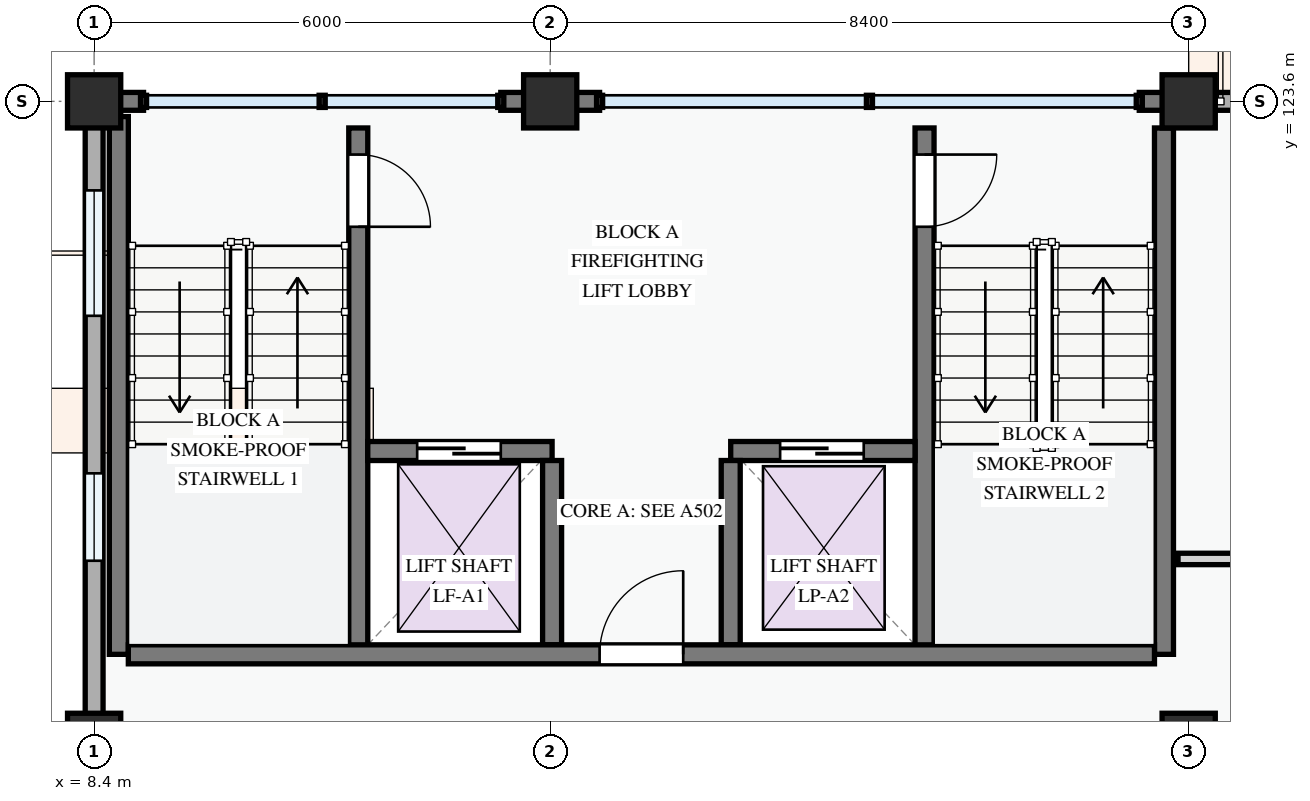
"""IFC4 building model, lengths in metres.
Left out: names, types, materials, properties, quantities, classifications, styles, units other than length and angle.
Written with IfcOpenShell. Run it as: python <this file> out.ifc"""

import sys

from ifc_helpers import new_model, si_unit, direction, frame, frame_2d, origin, origin_2d, place, context, subcontext, project, spatial, rectangle, extrude, element, fill, save


model = new_model("IFC4")
c1 = context("Model", 3, precision=1e-05, world=origin(), true_north=direction((0.0, 1.0)))
c2 = subcontext(c1, "Body", "Model", "MODEL_VIEW")
j1 = project(units=[si_unit("LENGTHUNIT", "METRE"), si_unit("PLANEANGLEUNIT", "RADIAN")], contexts=[c1])
p1 = place(None, origin())
s1 = spatial("IfcSite", under=j1, at=p1, CompositionType="ELEMENT")
p2 = place(p1, origin())
s2 = spatial("IfcBuilding", under=s1, at=p2, CompositionType="ELEMENT")
p3 = place(p2, frame((0.0, 0.0, 11.4)))
s3 = spatial("IfcBuildingStorey", under=s2, at=p3, CompositionType="ELEMENT", Elevation=11.4)
for number, where, z_axis, x_axis in (
    (1, (8.4, 115.2, 0.0), (0.0, 0.0, 1.0), (1.0, 0.0, 0.0)),
    (2, (8.4, 123.6, 0.0), (0.0, 0.0, 1.0), (1.0, 0.0, 0.0)),
    (3, (14.4, 123.6, 0.0), (0.0, 0.0, 1.0), (1.0, 0.0, 0.0)),
    (4, (22.8, 115.2, 0.0), (0.0, 0.0, 1.0), (1.0, 0.0, 0.0)),
    (5, (22.8, 123.6, 0.0), (0.0, 0.0, 1.0), (1.0, 0.0, 0.0)),
):
    element("IfcColumn", number, at=place(p3, frame(where, z_axis=z_axis, x_axis=x_axis)), inside=s3, PredefinedType="COLUMN", context=c2, shape_type="SweptSolid", body=[
        extrude(rectangle(XDim=0.7, YDim=0.7, at=origin_2d()), origin(), (0.0, 0.0, 1.0), 3.3),
    ])
p4 = place(p3, frame((28.8, 123.6, 0.0), z_axis=(0.0, 0.0, 1.0), x_axis=(-1.0, 0.0, 0.0)))
e6 = element("IfcWall", 6, at=p4, inside=s3, PredefinedType="STANDARD", context=c2, shape_type="SweptSolid", body=[
    extrude(rectangle(XDim=6.0, YDim=0.235, at=frame_2d((3.0, 0.0))), origin(), (0.0, 0.0, 1.0), 2.475),
])
p5 = place(p4, frame((0.62, 0.0, 0.0)))
e7 = element("IfcOpeningElement", 7, at=p5, cuts=e6, PredefinedType="OPENING", context=c2, shape_type="SweptSolid", body=[
    extrude(rectangle(XDim=1.3, YDim=2.15, at=frame_2d((0.65, 1.075))), frame((0.0, 0.127, 0.0), z_axis=(0.0, -1.0, 0.0), x_axis=(1.0, 0.0, 0.0)), (0.0, 0.0, 1.0), 0.255),
])
p6 = place(p4, frame((3.29, 0.0, 0.78)))
e8 = element("IfcOpeningElement", 8, at=p6, cuts=e6, PredefinedType="OPENING", context=c2, shape_type="SweptSolid", body=[
    extrude(rectangle(XDim=1.2, YDim=1.35, at=frame_2d((0.6, 0.675))), frame((0.0, 0.127, 0.0), z_axis=(0.0, -1.0, 0.0), x_axis=(1.0, 0.0, 0.0)), (0.0, 0.0, 1.0), 0.255),
])
for number, where, z_axis, x_axis in (
    (9, (22.8, 123.6, 0.0), (0.0, 0.0, 1.0), (-1.0, 0.0, 0.0)),
    (10, (15.05, 123.6, 0.0), (0.0, 0.0, 1.0), (-1.0, 0.0, 0.0)),
):
    element("IfcWall", number, at=place(p3, frame(where, z_axis=z_axis, x_axis=x_axis)), inside=s3, PredefinedType="STANDARD", context=c2, shape_type="SweptSolid", body=[
        extrude(rectangle(XDim=0.65, YDim=0.235, at=frame_2d((0.325, 0.0))), origin(), (0.0, 0.0, 1.0), 3.04),
    ])
p7 = place(p3, frame((14.4, 123.6, 0.0), z_axis=(0.0, 0.0, 1.0), x_axis=(-1.0, 0.0, 0.0)))
e11 = element("IfcWall", 11, at=p7, inside=s3, PredefinedType="STANDARD", context=c2, shape_type="SweptSolid", body=[
    extrude(rectangle(XDim=0.65, YDim=0.235, at=frame_2d((0.325, 0.0))), origin(), (0.0, 0.0, 1.0), 3.04),
])
p8 = place(p3, frame((9.05, 123.6, 0.0), z_axis=(0.0, 0.0, 1.0), x_axis=(-1.0, 0.0, 0.0)))
e12 = element("IfcWall", 12, at=p8, inside=s3, PredefinedType="STANDARD", context=c2, shape_type="SweptSolid", body=[
    extrude(rectangle(XDim=0.531, YDim=0.235, at=frame_2d((0.265, 0.0))), origin(), (0.0, 0.0, 1.0), 3.04),
])
p9 = place(p3, frame((8.4, 123.6, 0.0), z_axis=(0.0, 0.0, 1.0), x_axis=(0.0, -1.0, 0.0)))
e13 = element("IfcWall", 13, at=p9, inside=s3, PredefinedType="STANDARD", context=c2, shape_type="SweptSolid", body=[
    extrude(rectangle(XDim=8.4, YDim=0.235, at=frame_2d((4.2, 0.0))), origin(), (0.0, 0.0, 1.0), 2.425),
])
p10 = place(p9, frame((1.171, 0.0, 0.78)))
e14 = element("IfcOpeningElement", 14, at=p10, cuts=e13, PredefinedType="OPENING", context=c2, shape_type="SweptSolid", body=[
    extrude(rectangle(XDim=1.65, YDim=1.5, at=frame_2d((0.825, 0.75))), frame((0.0, 0.127, 0.0), z_axis=(0.0, -1.0, 0.0), x_axis=(1.0, 0.0, 0.0)), (0.0, 0.0, 1.0), 0.255),
])
p11 = place(p9, frame((4.894, 0.0, 0.78)))
e15 = element("IfcOpeningElement", 15, at=p11, cuts=e13, PredefinedType="OPENING", context=c2, shape_type="SweptSolid", body=[
    extrude(rectangle(XDim=1.15, YDim=1.25, at=frame_2d((0.575, 0.625))), frame((0.0, 0.127, 0.0), z_axis=(0.0, -1.0, 0.0), x_axis=(1.0, 0.0, 0.0)), (0.0, 0.0, 1.0), 0.255),
])
p12 = place(p3, frame((11.875, 123.25, 0.0), z_axis=(0.0, 0.0, 1.0), x_axis=(0.0, -1.0, 0.0)))
e16 = element("IfcWall", 16, at=p12, inside=s3, PredefinedType="SHEAR", context=c2, shape_type="SweptSolid", body=[
    extrude(rectangle(XDim=6.925, YDim=0.25, at=frame_2d((3.462, 0.0))), origin(), (0.0, 0.0, 1.0), 3.0),
])
p13 = place(p12, frame((0.35, 0.0, 0.0)))
e17 = element("IfcOpeningElement", 17, at=p13, cuts=e16, PredefinedType="OPENING", context=c2, shape_type="SweptSolid", body=[
    extrude(rectangle(XDim=0.95, YDim=2.1, at=frame_2d((0.475, 1.05))), frame((0.0, 0.135, 0.0), z_axis=(0.0, -1.0, 0.0), x_axis=(1.0, 0.0, 0.0)), (0.0, 0.0, 1.0), 0.27),
])
p14 = place(p3, frame((8.725, 123.4, 0.0), z_axis=(0.0, 0.0, 1.0), x_axis=(0.0, -1.0, 0.0)))
e18 = element("IfcWall", 18, at=p14, inside=s3, PredefinedType="SHEAR", context=c2, shape_type="SweptSolid", body=[
    extrude(rectangle(XDim=7.075, YDim=0.25, at=frame_2d((3.538, 0.0))), origin(), (0.0, 0.0, 1.0), 3.0),
])
p15 = place(p3, frame((22.475, 123.25, 0.0), z_axis=(0.0, 0.0, 1.0), x_axis=(0.0, -1.0, 0.0)))
e19 = element("IfcWall", 19, at=p15, inside=s3, PredefinedType="SHEAR", context=c2, shape_type="SweptSolid", body=[
    extrude(rectangle(XDim=6.925, YDim=0.25, at=frame_2d((3.462, 0.0))), origin(), (0.0, 0.0, 1.0), 3.0),
])
p16 = place(p3, frame((19.325, 123.25, 0.0), z_axis=(0.0, 0.0, 1.0), x_axis=(0.0, -1.0, 0.0)))
e20 = element("IfcWall", 20, at=p16, inside=s3, PredefinedType="SHEAR", context=c2, shape_type="SweptSolid", body=[
    extrude(rectangle(XDim=6.925, YDim=0.25, at=frame_2d((3.462, 0.0))), origin(), (0.0, 0.0, 1.0), 3.0),
])
p17 = place(p16, frame((0.35, 0.0, 0.0)))
e21 = element("IfcOpeningElement", 21, at=p17, cuts=e20, PredefinedType="OPENING", context=c2, shape_type="SweptSolid", body=[
    extrude(rectangle(XDim=0.95, YDim=2.1, at=frame_2d((0.475, 1.05))), frame((0.0, 0.135, 0.0), z_axis=(0.0, -1.0, 0.0), x_axis=(1.0, 0.0, 0.0)), (0.0, 0.0, 1.0), 0.27),
])
p18 = place(p3, frame((12.0, 119.0, 0.0), z_axis=(0.0, 0.0, 1.0), x_axis=(1.0, 0.0, 0.0)))
e22 = element("IfcWall", 22, at=p18, inside=s3, PredefinedType="SHEAR", context=c2, shape_type="SweptSolid", body=[
    extrude(rectangle(XDim=2.425, YDim=0.25, at=frame_2d((1.212, 0.0))), origin(), (0.0, 0.0, 1.0), 3.0),
])
p19 = place(p18, frame((0.65, 0.0, 0.0)))
e23 = element("IfcOpeningElement", 23, at=p19, cuts=e22, PredefinedType="OPENING", context=c2, shape_type="SweptSolid", body=[
    extrude(rectangle(XDim=1.1, YDim=2.15, at=frame_2d((0.55, 1.075))), frame((0.0, 0.135, 0.0), z_axis=(0.0, -1.0, 0.0), x_axis=(1.0, 0.0, 0.0)), (0.0, 0.0, 1.0), 0.27),
])
p20 = place(p3, frame((16.775, 119.0, 0.0), z_axis=(0.0, 0.0, 1.0), x_axis=(1.0, 0.0, 0.0)))
e24 = element("IfcWall", 24, at=p20, inside=s3, PredefinedType="SHEAR", context=c2, shape_type="SweptSolid", body=[
    extrude(rectangle(XDim=2.425, YDim=0.25, at=frame_2d((1.212, 0.0))), origin(), (0.0, 0.0, 1.0), 3.0),
])
p21 = place(p20, frame((0.65, 0.0, 0.0)))
e25 = element("IfcOpeningElement", 25, at=p21, cuts=e24, PredefinedType="OPENING", context=c2, shape_type="SweptSolid", body=[
    extrude(rectangle(XDim=1.1, YDim=2.15, at=frame_2d((0.55, 1.075))), frame((0.0, 0.135, 0.0), z_axis=(0.0, -1.0, 0.0), x_axis=(1.0, 0.0, 0.0)), (0.0, 0.0, 1.0), 0.27),
])
for number, where, z_axis, x_axis in (
    (26, (14.425, 118.875, 0.0), (0.0, 0.0, 1.0), (0.0, -1.0, 0.0)),
    (27, (16.775, 118.875, 0.0), (0.0, 0.0, 1.0), (0.0, -1.0, 0.0)),
):
    element("IfcWall", number, at=place(p3, frame(where, z_axis=z_axis, x_axis=x_axis)), inside=s3, PredefinedType="SHEAR", context=c2, shape_type="SweptSolid", body=[
        extrude(rectangle(XDim=2.425, YDim=0.25, at=frame_2d((1.212, 0.0))), origin(), (0.0, 0.0, 1.0), 3.0),
    ])
p22 = place(p3, frame((8.85, 116.325, 0.0), z_axis=(0.0, 0.0, 1.0), x_axis=(1.0, 0.0, 0.0)))
e28 = element("IfcWall", 28, at=p22, inside=s3, PredefinedType="SHEAR", context=c2, shape_type="SweptSolid", body=[
    extrude(rectangle(XDim=13.5, YDim=0.25, at=frame_2d((6.75, 0.0))), origin(), (0.0, 0.0, 1.0), 3.0),
])
p23 = place(p22, frame((6.2, 0.0, 0.0)))
e29 = element("IfcOpeningElement", 29, at=p23, cuts=e28, PredefinedType="OPENING", context=c2, shape_type="SweptSolid", body=[
    extrude(rectangle(XDim=1.1, YDim=2.15, at=frame_2d((0.55, 1.075))), frame((0.0, 0.135, 0.0), z_axis=(0.0, -1.0, 0.0), x_axis=(1.0, 0.0, 0.0)), (0.0, 0.0, 1.0), 0.27),
])
p24 = place(p3, frame((22.66, 117.58, 0.0), z_axis=(0.0, 0.0, 1.0), x_axis=(1.0, 0.0, 0.0)))
e30 = element("IfcWall", 30, at=p24, inside=s3, PredefinedType="PARTITIONING", context=c2, shape_type="SweptSolid", body=[
    extrude(rectangle(XDim=34.88, YDim=0.15, at=frame_2d((17.44, 0.0))), origin(), (0.0, 0.0, 1.0), 3.0),
])
p25 = place(p24, frame((2.74, 0.0, 0.0)))
e31 = element("IfcOpeningElement", 31, at=p25, cuts=e30, PredefinedType="OPENING", context=c2, shape_type="SweptSolid", body=[
    extrude(rectangle(XDim=0.92, YDim=2.1, at=frame_2d((0.46, 1.05))), frame((0.0, 0.085, 0.0), z_axis=(0.0, -1.0, 0.0), x_axis=(1.0, 0.0, 0.0)), (0.0, 0.0, 1.0), 0.17),
])
p26 = place(p24, frame((17.085, 0.0, 0.0)))
e32 = element("IfcOpeningElement", 32, at=p26, cuts=e30, PredefinedType="OPENING", context=c2, shape_type="SweptSolid", body=[
    extrude(rectangle(XDim=0.92, YDim=2.1, at=frame_2d((0.46, 1.05))), frame((0.0, 0.085, 0.0), z_axis=(0.0, -1.0, 0.0), x_axis=(1.0, 0.0, 0.0)), (0.0, 0.0, 1.0), 0.17),
])
p27 = place(p24, frame((24.77, 0.0, 0.0)))
e33 = element("IfcOpeningElement", 33, at=p27, cuts=e30, PredefinedType="OPENING", context=c2, shape_type="SweptSolid", body=[
    extrude(rectangle(XDim=0.92, YDim=2.1, at=frame_2d((0.46, 1.05))), frame((0.0, 0.085, 0.0), z_axis=(0.0, -1.0, 0.0), x_axis=(1.0, 0.0, 0.0)), (0.0, 0.0, 1.0), 0.17),
])
p28 = place(p10, origin())
e34 = element("IfcWindow", 34, at=p28, inside=s3, PartitioningType="DOUBLE_PANEL_VERTICAL", PredefinedType="WINDOW", context=c2, shape_type="SweptSolid", body=[
    extrude(rectangle(XDim=1.65, YDim=1.5, at=frame_2d((0.825, 0.75))), frame((0.0, 0.03, 0.0), z_axis=(0.0, -1.0, 0.0), x_axis=(1.0, 0.0, 0.0)), (0.0, 0.0, 1.0), 0.06),
])
fill(e14, e34)
p29 = place(p11, origin())
e35 = element("IfcWindow", 35, at=p29, inside=s3, PartitioningType="SINGLE_PANEL", PredefinedType="WINDOW", context=c2, shape_type="SweptSolid", body=[
    extrude(rectangle(XDim=1.15, YDim=1.25, at=frame_2d((0.575, 0.625))), frame((0.0, 0.03, 0.0), z_axis=(0.0, -1.0, 0.0), x_axis=(1.0, 0.0, 0.0)), (0.0, 0.0, 1.0), 0.06),
])
fill(e15, e35)
p30 = place(p13, origin())
e36 = element("IfcDoor", 36, at=p30, inside=s3, OperationType="SINGLE_SWING_RIGHT", PredefinedType="DOOR", context=c2, shape_type="SweptSolid", body=[
    extrude(rectangle(XDim=0.95, YDim=2.1, at=frame_2d((0.475, 1.05))), frame((0.0, 0.025, 0.0), z_axis=(0.0, -1.0, 0.0), x_axis=(1.0, 0.0, 0.0)), (0.0, 0.0, 1.0), 0.05),
])
fill(e17, e36)
p31 = place(p17, origin())
e37 = element("IfcDoor", 37, at=p31, inside=s3, OperationType="SINGLE_SWING_LEFT", PredefinedType="DOOR", context=c2, shape_type="SweptSolid", body=[
    extrude(rectangle(XDim=0.95, YDim=2.1, at=frame_2d((0.475, 1.05))), frame((0.0, 0.025, 0.0), z_axis=(0.0, -1.0, 0.0), x_axis=(1.0, 0.0, 0.0)), (0.0, 0.0, 1.0), 0.05),
])
fill(e21, e37)
p32 = place(p19, origin())
e38 = element("IfcDoor", 38, at=p32, inside=s3, OperationType="SLIDING_TO_LEFT", PredefinedType="DOOR", context=c2, shape_type="SweptSolid", body=[
    extrude(rectangle(XDim=1.1, YDim=2.15, at=frame_2d((0.55, 1.075))), frame((0.0, 0.025, 0.0), z_axis=(0.0, -1.0, 0.0), x_axis=(1.0, 0.0, 0.0)), (0.0, 0.0, 1.0), 0.05),
])
fill(e23, e38)
p33 = place(p21, origin())
e39 = element("IfcDoor", 39, at=p33, inside=s3, OperationType="SLIDING_TO_LEFT", PredefinedType="DOOR", context=c2, shape_type="SweptSolid", body=[
    extrude(rectangle(XDim=1.1, YDim=2.15, at=frame_2d((0.55, 1.075))), frame((0.0, 0.025, 0.0), z_axis=(0.0, -1.0, 0.0), x_axis=(1.0, 0.0, 0.0)), (0.0, 0.0, 1.0), 0.05),
])
fill(e25, e39)
p34 = place(p23, origin())
e40 = element("IfcDoor", 40, at=p34, inside=s3, OperationType="SINGLE_SWING_RIGHT", PredefinedType="DOOR", context=c2, shape_type="SweptSolid", body=[
    extrude(rectangle(XDim=1.1, YDim=2.15, at=frame_2d((0.55, 1.075))), frame((0.0, 0.025, 0.0), z_axis=(0.0, -1.0, 0.0), x_axis=(1.0, 0.0, 0.0)), (0.0, 0.0, 1.0), 0.05),
])
fill(e29, e40)
save(model, sys.argv[1])
